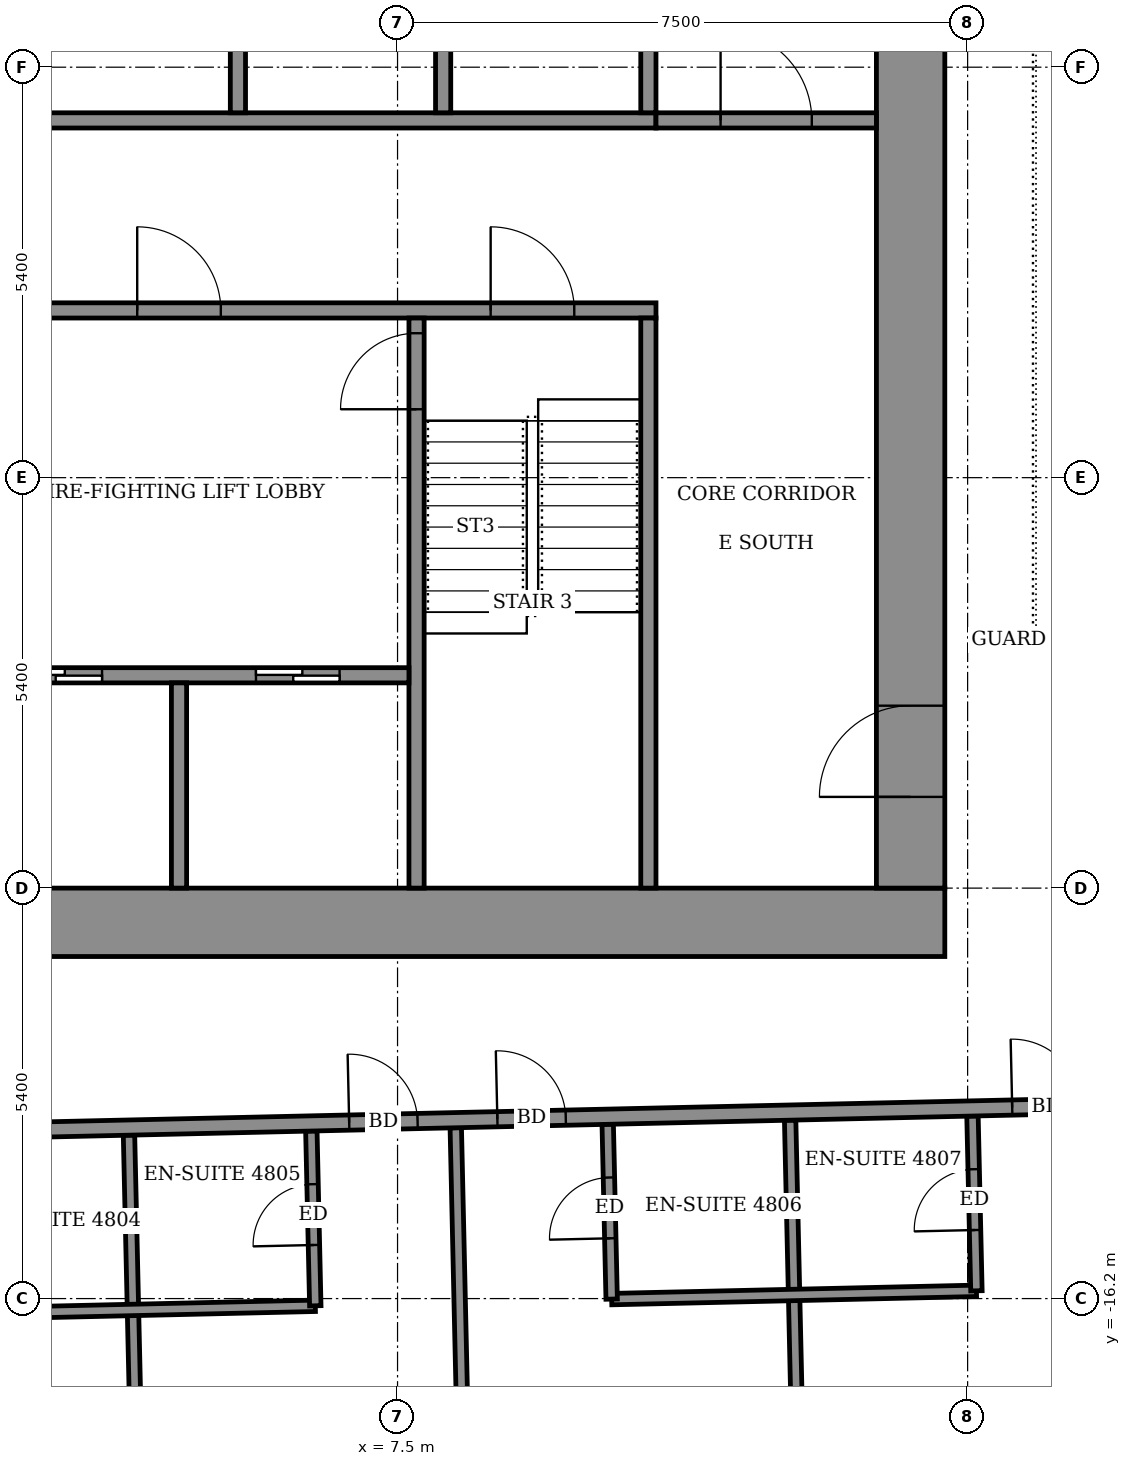
"""IFC4 building model, lengths in metres.
Left out: names, types, materials, properties, quantities, classifications, styles, units other than length and angle.
Written with IfcOpenShell. Run it as: python <this file> out.ifc"""

import sys

from ifc_helpers import new_model, si_unit, direction, frame, frame_2d, origin, place, context, subcontext, project, spatial, rectangle, extrude, element, fill, save


model = new_model("IFC4")
c1 = context("Model", 3, precision=1e-05, world=origin(), true_north=direction((0.0, 1.0)))
c2 = subcontext(c1, "Body", "Model", "MODEL_VIEW")
j1 = project(units=[si_unit("LENGTHUNIT", "METRE"), si_unit("PLANEANGLEUNIT", "RADIAN")], contexts=[c1])
p1 = place(None, origin())
s1 = spatial("IfcSite", under=j1, at=p1, CompositionType="ELEMENT")
p2 = place(p1, origin())
s2 = spatial("IfcBuilding", under=s1, at=p2, CompositionType="ELEMENT")
p3 = place(p2, frame((0.0, 0.0, 189.7)))
s3 = spatial("IfcBuildingStorey", under=s2, at=p3, CompositionType="ELEMENT", Elevation=189.7)
p4 = place(p3, frame((4.102, -19.999, 0.0), z_axis=(0.0, 0.0, 1.0), x_axis=(-0.022688785847, 0.999742576365, 0.0)))
e1 = element("IfcWall", 1, at=p4, inside=s3, PredefinedType="PARTITIONING", context=c2, shape_type="SweptSolid", body=[
    extrude(rectangle(XDim=5.95, YDim=0.15, at=frame_2d((2.975, 0.0))), origin(), (0.0, 0.0, 1.0), 2.55),
])
p5 = place(p3, frame((8.407, -20.201, 0.0), z_axis=(0.0, 0.0, 1.0), x_axis=(-0.022540379945, 0.999745933361, 0.0)))
e2 = element("IfcWall", 2, at=p5, inside=s3, PredefinedType="PARTITIONING", context=c2, shape_type="SweptSolid", body=[
    extrude(rectangle(XDim=6.25, YDim=0.15, at=frame_2d((3.125, 0.0))), origin(), (0.0, 0.0, 1.0), 3.05),
])
p6 = place(p3, frame((12.806, -20.101, 0.0), z_axis=(0.0, 0.0, 1.0), x_axis=(-0.022540379945, 0.999745933361, 0.0)))
e3 = element("IfcWall", 3, at=p6, inside=s3, PredefinedType="PARTITIONING", context=c2, shape_type="SweptSolid", body=[
    extrude(rectangle(XDim=6.25, YDim=0.15, at=frame_2d((3.125, 0.0))), origin(), (0.0, 0.0, 1.0), 2.55),
])
p7 = place(p3, frame((1.62, -16.404, 0.0), z_axis=(0.0, 0.0, 1.0), x_axis=(0.999741415159, 0.022739894798, 0.0)))
e4 = element("IfcWall", 4, at=p7, inside=s3, PredefinedType="PARTITIONING", context=c2, shape_type="SweptSolid", body=[
    extrude(rectangle(XDim=4.799, YDim=0.15, at=frame_2d((2.399, 0.0))), origin(), (0.0, 0.0, 1.0), 3.05),
])
p8 = place(p3, frame((6.418, -16.295, 0.0), z_axis=(0.0, 0.0, 1.0), x_axis=(-0.022615284993, 0.999744241736, 0.0)))
e5 = element("IfcWall", 5, at=p8, inside=s3, PredefinedType="PARTITIONING", context=c2, shape_type="SweptSolid", body=[
    extrude(rectangle(XDim=2.299, YDim=0.15, at=frame_2d((1.15, 0.0))), origin(), (0.0, 0.0, 1.0), 3.05),
])
p9 = place(p8, frame((0.8, 0.0, 0.0)))
e6 = element("IfcOpeningElement", 6, at=p9, cuts=e5, PredefinedType="OPENING", context=c2, shape_type="SweptSolid", body=[
    extrude(rectangle(XDim=0.8, YDim=2.1, at=frame_2d((0.4, 1.05))), frame((0.0, 0.085, 0.0), z_axis=(0.0, -1.0, 0.0), x_axis=(1.0, 0.0, 0.0)), (0.0, 0.0, 1.0), 0.17),
])
p10 = place(p3, frame((10.317, -16.207, 0.0), z_axis=(0.0, 0.0, 1.0), x_axis=(0.99974154664, 0.022734113616, 0.0)))
e7 = element("IfcWall", 7, at=p10, inside=s3, PredefinedType="PARTITIONING", context=c2, shape_type="SweptSolid", body=[
    extrude(rectangle(XDim=4.8, YDim=0.15, at=frame_2d((2.4, 0.0))), origin(), (0.0, 0.0, 1.0), 3.05),
])
p11 = place(p3, frame((10.317, -16.207, 0.0), z_axis=(0.0, 0.0, 1.0), x_axis=(-0.022603288534, 0.999744513037, 0.0)))
e8 = element("IfcWall", 8, at=p11, inside=s3, PredefinedType="PARTITIONING", context=c2, shape_type="SweptSolid", body=[
    extrude(rectangle(XDim=2.301, YDim=0.15, at=frame_2d((1.15, 0.0))), origin(), (0.0, 0.0, 1.0), 3.05),
])
p12 = place(p11, frame((0.8, 0.0, 0.0)))
e9 = element("IfcOpeningElement", 9, at=p12, cuts=e8, PredefinedType="OPENING", context=c2, shape_type="SweptSolid", body=[
    extrude(rectangle(XDim=0.8, YDim=2.1, at=frame_2d((0.4, 1.05))), frame((0.0, 0.085, 0.0), z_axis=(0.0, -1.0, 0.0), x_axis=(1.0, 0.0, 0.0)), (0.0, 0.0, 1.0), 0.17),
])
p13 = place(p3, frame((15.116, -16.098, 0.0), z_axis=(0.0, 0.0, 1.0), x_axis=(-0.022615284993, 0.999744241736, 0.0)))
e10 = element("IfcWall", 10, at=p13, inside=s3, PredefinedType="PARTITIONING", context=c2, shape_type="SweptSolid", body=[
    extrude(rectangle(XDim=2.299, YDim=0.15, at=frame_2d((1.15, 0.0))), origin(), (0.0, 0.0, 1.0), 3.05),
])
p14 = place(p13, frame((0.8, 0.0, 0.0)))
e11 = element("IfcOpeningElement", 11, at=p14, cuts=e10, PredefinedType="OPENING", context=c2, shape_type="SweptSolid", body=[
    extrude(rectangle(XDim=0.8, YDim=2.1, at=frame_2d((0.4, 1.05))), frame((0.0, 0.085, 0.0), z_axis=(0.0, -1.0, 0.0), x_axis=(1.0, 0.0, 0.0)), (0.0, 0.0, 1.0), 0.17),
])
p15 = place(p3, frame((-21.279, -14.523, 0.0), z_axis=(0.0, 0.0, 1.0), x_axis=(0.999742878501, 0.022675468818, 0.0)))
e12 = element("IfcWall", 12, at=p15, inside=s3, PredefinedType="PARTITIONING", context=c2, shape_type="SweptSolid", body=[
    extrude(rectangle(XDim=46.48, YDim=0.2, at=frame_2d((23.24, 0.0))), origin(), (0.0, 0.0, 1.0), 3.05),
])
p16 = place(p15, frame((1.4, 0.0, 0.0)))
e13 = element("IfcOpeningElement", 13, at=p16, cuts=e12, PredefinedType="OPENING", context=c2, shape_type="SweptSolid", body=[
    extrude(rectangle(XDim=1.0, YDim=2.1, at=frame_2d((0.5, 1.05))), frame((0.0, 0.11, 0.0), z_axis=(0.0, -1.0, 0.0), x_axis=(1.0, 0.0, 0.0)), (0.0, 0.0, 1.0), 0.22),
])
p17 = place(p15, frame((5.95, 0.0, 0.0)))
e14 = element("IfcOpeningElement", 14, at=p17, cuts=e12, PredefinedType="OPENING", context=c2, shape_type="SweptSolid", body=[
    extrude(rectangle(XDim=0.9, YDim=2.1, at=frame_2d((0.45, 1.05))), frame((0.0, 0.11, 0.0), z_axis=(0.0, -1.0, 0.0), x_axis=(1.0, 0.0, 0.0)), (0.0, 0.0, 1.0), 0.22),
])
p18 = place(p15, frame((10.575, 0.0, 0.0)))
e15 = element("IfcOpeningElement", 15, at=p18, cuts=e12, PredefinedType="OPENING", context=c2, shape_type="SweptSolid", body=[
    extrude(rectangle(XDim=0.9, YDim=2.1, at=frame_2d((0.45, 1.05))), frame((0.0, 0.11, 0.0), z_axis=(0.0, -1.0, 0.0), x_axis=(1.0, 0.0, 0.0)), (0.0, 0.0, 1.0), 0.22),
])
p19 = place(p15, frame((12.625, 0.0, 0.0)))
e16 = element("IfcOpeningElement", 16, at=p19, cuts=e12, PredefinedType="OPENING", context=c2, shape_type="SweptSolid", body=[
    extrude(rectangle(XDim=0.9, YDim=2.1, at=frame_2d((0.45, 1.05))), frame((0.0, 0.11, 0.0), z_axis=(0.0, -1.0, 0.0), x_axis=(1.0, 0.0, 0.0)), (0.0, 0.0, 1.0), 0.22),
])
p20 = place(p15, frame((19.4, 0.0, 0.0)))
e17 = element("IfcOpeningElement", 17, at=p20, cuts=e12, PredefinedType="OPENING", context=c2, shape_type="SweptSolid", body=[
    extrude(rectangle(XDim=0.9, YDim=2.1, at=frame_2d((0.45, 1.05))), frame((0.0, 0.11, 0.0), z_axis=(0.0, -1.0, 0.0), x_axis=(1.0, 0.0, 0.0)), (0.0, 0.0, 1.0), 0.22),
])
p21 = place(p15, frame((21.375, 0.0, 0.0)))
e18 = element("IfcOpeningElement", 18, at=p21, cuts=e12, PredefinedType="OPENING", context=c2, shape_type="SweptSolid", body=[
    extrude(rectangle(XDim=0.9, YDim=2.1, at=frame_2d((0.45, 1.05))), frame((0.0, 0.11, 0.0), z_axis=(0.0, -1.0, 0.0), x_axis=(1.0, 0.0, 0.0)), (0.0, 0.0, 1.0), 0.22),
])
p22 = place(p15, frame((28.15, 0.0, 0.0)))
e19 = element("IfcOpeningElement", 19, at=p22, cuts=e12, PredefinedType="OPENING", context=c2, shape_type="SweptSolid", body=[
    extrude(rectangle(XDim=0.9, YDim=2.1, at=frame_2d((0.45, 1.05))), frame((0.0, 0.11, 0.0), z_axis=(0.0, -1.0, 0.0), x_axis=(1.0, 0.0, 0.0)), (0.0, 0.0, 1.0), 0.22),
])
p23 = place(p15, frame((30.1, 0.0, 0.0)))
e20 = element("IfcOpeningElement", 20, at=p23, cuts=e12, PredefinedType="OPENING", context=c2, shape_type="SweptSolid", body=[
    extrude(rectangle(XDim=0.9, YDim=2.1, at=frame_2d((0.45, 1.05))), frame((0.0, 0.11, 0.0), z_axis=(0.0, -1.0, 0.0), x_axis=(1.0, 0.0, 0.0)), (0.0, 0.0, 1.0), 0.22),
])
p24 = place(p15, frame((36.875, 0.0, 0.0)))
e21 = element("IfcOpeningElement", 21, at=p24, cuts=e12, PredefinedType="OPENING", context=c2, shape_type="SweptSolid", body=[
    extrude(rectangle(XDim=0.9, YDim=2.1, at=frame_2d((0.45, 1.05))), frame((0.0, 0.11, 0.0), z_axis=(0.0, -1.0, 0.0), x_axis=(1.0, 0.0, 0.0)), (0.0, 0.0, 1.0), 0.22),
])
p25 = place(p15, frame((43.89, 0.0, 0.0)))
e22 = element("IfcOpeningElement", 22, at=p25, cuts=e12, PredefinedType="OPENING", context=c2, shape_type="SweptSolid", body=[
    extrude(rectangle(XDim=1.0, YDim=2.1, at=frame_2d((0.5, 1.05))), frame((0.0, 0.11, 0.0), z_axis=(0.0, -1.0, 0.0), x_axis=(1.0, 0.0, 0.0)), (0.0, 0.0, 1.0), 0.22),
])
p26 = place(p15, frame((39.05, 0.0, 0.0)))
e23 = element("IfcOpeningElement", 23, at=p26, cuts=e12, PredefinedType="OPENING", context=c2, shape_type="SweptSolid", body=[
    extrude(rectangle(XDim=0.9, YDim=2.1, at=frame_2d((0.45, 1.05))), frame((0.0, 0.11, 0.0), z_axis=(0.0, -1.0, 0.0), x_axis=(1.0, 0.0, 0.0)), (0.0, 0.0, 1.0), 0.22),
])
p27 = place(p3, frame((-14.7, -11.25, 0.0), z_axis=(0.0, 0.0, 1.0), x_axis=(1.0, 0.0, 0.0)))
e24 = element("IfcWall", 24, at=p27, inside=s3, PredefinedType="SHEAR", context=c2, shape_type="SweptSolid", body=[
    extrude(rectangle(XDim=29.4, YDim=0.9, at=frame_2d((14.7, 0.0))), origin(), (0.0, 0.0, 1.0), 3.6),
])
p28 = place(p3, frame((14.25, -10.8, 0.0), z_axis=(0.0, 0.0, 1.0), x_axis=(0.0, 1.0, 0.0)))
e25 = element("IfcWall", 25, at=p28, inside=s3, PredefinedType="SHEAR", context=c2, shape_type="SweptSolid", body=[
    extrude(rectangle(XDim=21.6, YDim=0.9, at=frame_2d((10.8, 0.0))), origin(), (0.0, 0.0, 1.0), 3.6),
])
p29 = place(p28, frame((1.2, 0.0, 0.0)))
e26 = element("IfcOpeningElement", 26, at=p29, cuts=e25, PredefinedType="OPENING", context=c2, shape_type="SweptSolid", body=[
    extrude(rectangle(XDim=1.2, YDim=2.1, at=frame_2d((0.6, 1.05))), frame((0.0, 0.46, 0.0), z_axis=(0.0, -1.0, 0.0), x_axis=(1.0, 0.0, 0.0)), (0.0, 0.0, 1.0), 0.92),
])
p30 = place(p3, frame((-10.9, -3.2, 0.0), z_axis=(0.0, 0.0, 1.0), x_axis=(1.0, 0.0, 0.0)))
e27 = element("IfcWall", 27, at=p30, inside=s3, PredefinedType="SHEAR", context=c2, shape_type="SweptSolid", body=[
    extrude(rectangle(XDim=21.8, YDim=0.2, at=frame_2d((10.9, 0.0))), origin(), (0.0, 0.0, 1.0), 3.05),
])
p31 = place(p30, frame((1.075, 0.0, 0.0)))
e28 = element("IfcOpeningElement", 28, at=p31, cuts=e27, PredefinedType="OPENING", context=c2, shape_type="SweptSolid", body=[
    extrude(rectangle(XDim=1.1, YDim=2.1, at=frame_2d((0.55, 1.05))), frame((0.0, 0.11, 0.0), z_axis=(0.0, -1.0, 0.0), x_axis=(1.0, 0.0, 0.0)), (0.0, 0.0, 1.0), 0.22),
])
p32 = place(p30, frame((10.325, 0.0, 0.0)))
e29 = element("IfcOpeningElement", 29, at=p32, cuts=e27, PredefinedType="OPENING", context=c2, shape_type="SweptSolid", body=[
    extrude(rectangle(XDim=1.1, YDim=2.1, at=frame_2d((0.55, 1.05))), frame((0.0, 0.11, 0.0), z_axis=(0.0, -1.0, 0.0), x_axis=(1.0, 0.0, 0.0)), (0.0, 0.0, 1.0), 0.22),
])
p33 = place(p30, frame((19.625, 0.0, 0.0)))
e30 = element("IfcOpeningElement", 30, at=p33, cuts=e27, PredefinedType="OPENING", context=c2, shape_type="SweptSolid", body=[
    extrude(rectangle(XDim=1.1, YDim=2.1, at=frame_2d((0.55, 1.05))), frame((0.0, 0.11, 0.0), z_axis=(0.0, -1.0, 0.0), x_axis=(1.0, 0.0, 0.0)), (0.0, 0.0, 1.0), 0.22),
])
p34 = place(p30, frame((5.7, 0.0, 0.0)))
e31 = element("IfcOpeningElement", 31, at=p34, cuts=e27, PredefinedType="OPENING", context=c2, shape_type="SweptSolid", body=[
    extrude(rectangle(XDim=1.1, YDim=2.1, at=frame_2d((0.55, 1.05))), frame((0.0, 0.11, 0.0), z_axis=(0.0, -1.0, 0.0), x_axis=(1.0, 0.0, 0.0)), (0.0, 0.0, 1.0), 0.22),
])
p35 = place(p30, frame((14.975, 0.0, 0.0)))
e32 = element("IfcOpeningElement", 32, at=p35, cuts=e27, PredefinedType="OPENING", context=c2, shape_type="SweptSolid", body=[
    extrude(rectangle(XDim=1.1, YDim=2.1, at=frame_2d((0.55, 1.05))), frame((0.0, 0.11, 0.0), z_axis=(0.0, -1.0, 0.0), x_axis=(1.0, 0.0, 0.0)), (0.0, 0.0, 1.0), 0.22),
])
p36 = place(p3, frame((-10.9, -0.7, 0.0), z_axis=(0.0, 0.0, 1.0), x_axis=(1.0, 0.0, 0.0)))
e33 = element("IfcWall", 33, at=p36, inside=s3, PredefinedType="SHEAR", context=c2, shape_type="SweptSolid", body=[
    extrude(rectangle(XDim=21.8, YDim=0.2, at=frame_2d((10.9, 0.0))), origin(), (0.0, 0.0, 1.0), 3.05),
])
p37 = place(p3, frame((7.75, -10.8, 0.0), z_axis=(0.0, 0.0, 1.0), x_axis=(0.0, 1.0, 0.0)))
e34 = element("IfcWall", 34, at=p37, inside=s3, PredefinedType="SHEAR", context=c2, shape_type="SweptSolid", body=[
    extrude(rectangle(XDim=7.5, YDim=0.2, at=frame_2d((3.75, 0.0))), origin(), (0.0, 0.0, 1.0), 3.05),
])
p38 = place(p37, frame((6.3, 0.0, 0.0)))
e35 = element("IfcOpeningElement", 35, at=p38, cuts=e34, PredefinedType="OPENING", context=c2, shape_type="SweptSolid", body=[
    extrude(rectangle(XDim=1.0, YDim=2.1, at=frame_2d((0.5, 1.05))), frame((0.0, 0.11, 0.0), z_axis=(0.0, -1.0, 0.0), x_axis=(1.0, 0.0, 0.0)), (0.0, 0.0, 1.0), 0.22),
])
p39 = place(p3, frame((10.8, -10.8, 0.0), z_axis=(0.0, 0.0, 1.0), x_axis=(0.0, 1.0, 0.0)))
e36 = element("IfcWall", 36, at=p39, inside=s3, PredefinedType="SHEAR", context=c2, shape_type="SweptSolid", body=[
    extrude(rectangle(XDim=7.5, YDim=0.2, at=frame_2d((3.75, 0.0))), origin(), (0.0, 0.0, 1.0), 3.05),
])
p40 = place(p3, frame((1.6, -8.0, 0.0), z_axis=(0.0, 0.0, 1.0), x_axis=(1.0, 0.0, 0.0)))
e37 = element("IfcWall", 37, at=p40, inside=s3, PredefinedType="SHEAR", context=c2, shape_type="SweptSolid", body=[
    extrude(rectangle(XDim=6.05, YDim=0.2, at=frame_2d((3.025, 0.0))), origin(), (0.0, 0.0, 1.0), 3.05),
])
p41 = place(p40, frame((0.913, 0.0, 0.0)))
e38 = element("IfcOpeningElement", 38, at=p41, cuts=e37, PredefinedType="OPENING", context=c2, shape_type="SweptSolid", body=[
    extrude(rectangle(XDim=1.1, YDim=2.1, at=frame_2d((0.55, 1.05))), frame((0.0, 0.11, 0.0), z_axis=(0.0, -1.0, 0.0), x_axis=(1.0, 0.0, 0.0)), (0.0, 0.0, 1.0), 0.22),
])
p42 = place(p40, frame((4.038, 0.0, 0.0)))
e39 = element("IfcOpeningElement", 39, at=p42, cuts=e37, PredefinedType="OPENING", context=c2, shape_type="SweptSolid", body=[
    extrude(rectangle(XDim=1.1, YDim=2.1, at=frame_2d((0.55, 1.05))), frame((0.0, 0.11, 0.0), z_axis=(0.0, -1.0, 0.0), x_axis=(1.0, 0.0, 0.0)), (0.0, 0.0, 1.0), 0.22),
])
p43 = place(p3, frame((4.625, -10.8, 0.0), z_axis=(0.0, 0.0, 1.0), x_axis=(0.0, 1.0, 0.0)))
e40 = element("IfcWall", 40, at=p43, inside=s3, PredefinedType="SHEAR", context=c2, shape_type="SweptSolid", body=[
    extrude(rectangle(XDim=2.7, YDim=0.2, at=frame_2d((1.35, 0.0))), origin(), (0.0, 0.0, 1.0), 3.05),
])
for number, where, z_axis, x_axis in (
    (41, (5.4, -0.6, 0.0), (0.0, 0.0, 1.0), (0.0, 1.0, 0.0)),
    (42, (8.1, -0.6, 0.0), (0.0, 0.0, 1.0), (0.0, 1.0, 0.0)),
    (43, (10.8, -0.6, 0.0), (0.0, 0.0, 1.0), (0.0, 1.0, 0.0)),
):
    element("IfcWall", number, at=place(p3, frame(where, z_axis=z_axis, x_axis=x_axis)), inside=s3, PredefinedType="SHEAR", context=c2, shape_type="SweptSolid", body=[
        extrude(rectangle(XDim=2.5, YDim=0.2, at=frame_2d((1.25, 0.0))), origin(), (0.0, 0.0, 1.0), 3.05),
    ])
p44 = place(p3, frame((10.9, -0.7, 0.0), z_axis=(0.0, 0.0, 1.0), x_axis=(1.0, 0.0, 0.0)))
e44 = element("IfcWall", 44, at=p44, inside=s3, PredefinedType="STANDARD", context=c2, shape_type="SweptSolid", body=[
    extrude(rectangle(XDim=2.9, YDim=0.2, at=frame_2d((1.45, 0.0))), origin(), (0.0, 0.0, 1.0), 3.05),
])
p45 = place(p44, frame((0.85, 0.0, 0.0)))
e45 = element("IfcOpeningElement", 45, at=p45, cuts=e44, PredefinedType="OPENING", context=c2, shape_type="SweptSolid", body=[
    extrude(rectangle(XDim=1.2, YDim=2.1, at=frame_2d((0.6, 1.05))), frame((0.0, 0.11, 0.0), z_axis=(0.0, -1.0, 0.0), x_axis=(1.0, 0.0, 0.0)), (0.0, 0.0, 1.0), 0.22),
])
p46 = place(p22, origin())
e46 = element("IfcDoor", 46, at=p46, inside=s3, OperationType="SINGLE_SWING_LEFT", PredefinedType="DOOR", context=c2, shape_type="SweptSolid", body=[
    extrude(rectangle(XDim=0.9, YDim=2.1, at=frame_2d((0.45, 1.05))), frame((0.0, 0.025, 0.0), z_axis=(0.0, -1.0, 0.0), x_axis=(1.0, 0.0, 0.0)), (0.0, 0.0, 1.0), 0.05),
])
fill(e19, e46)
p47 = place(p9, origin())
e47 = element("IfcDoor", 47, at=p47, inside=s3, OperationType="SINGLE_SWING_LEFT", PredefinedType="DOOR", context=c2, shape_type="SweptSolid", body=[
    extrude(rectangle(XDim=0.8, YDim=2.1, at=frame_2d((0.4, 1.05))), frame((0.0, 0.025, 0.0), z_axis=(0.0, -1.0, 0.0), x_axis=(1.0, 0.0, 0.0)), (0.0, 0.0, 1.0), 0.05),
])
fill(e6, e47)
p48 = place(p23, origin())
e48 = element("IfcDoor", 48, at=p48, inside=s3, OperationType="SINGLE_SWING_RIGHT", PredefinedType="DOOR", context=c2, shape_type="SweptSolid", body=[
    extrude(rectangle(XDim=0.9, YDim=2.1, at=frame_2d((0.45, 1.05))), frame((0.0, 0.025, 0.0), z_axis=(0.0, -1.0, 0.0), x_axis=(1.0, 0.0, 0.0)), (0.0, 0.0, 1.0), 0.05),
])
fill(e20, e48)
p49 = place(p12, origin())
e49 = element("IfcDoor", 49, at=p49, inside=s3, OperationType="SINGLE_SWING_RIGHT", PredefinedType="DOOR", context=c2, shape_type="SweptSolid", body=[
    extrude(rectangle(XDim=0.8, YDim=2.1, at=frame_2d((0.4, 1.05))), frame((0.0, 0.025, 0.0), z_axis=(0.0, -1.0, 0.0), x_axis=(1.0, 0.0, 0.0)), (0.0, 0.0, 1.0), 0.05),
])
fill(e9, e49)
p50 = place(p24, origin())
e50 = element("IfcDoor", 50, at=p50, inside=s3, OperationType="SINGLE_SWING_LEFT", PredefinedType="DOOR", context=c2, shape_type="SweptSolid", body=[
    extrude(rectangle(XDim=0.9, YDim=2.1, at=frame_2d((0.45, 1.05))), frame((0.0, 0.025, 0.0), z_axis=(0.0, -1.0, 0.0), x_axis=(1.0, 0.0, 0.0)), (0.0, 0.0, 1.0), 0.05),
])
fill(e21, e50)
p51 = place(p14, origin())
e51 = element("IfcDoor", 51, at=p51, inside=s3, OperationType="SINGLE_SWING_LEFT", PredefinedType="DOOR", context=c2, shape_type="SweptSolid", body=[
    extrude(rectangle(XDim=0.8, YDim=2.1, at=frame_2d((0.4, 1.05))), frame((0.0, 0.025, 0.0), z_axis=(0.0, -1.0, 0.0), x_axis=(1.0, 0.0, 0.0)), (0.0, 0.0, 1.0), 0.05),
])
fill(e11, e51)
p52 = place(p29, origin())
e52 = element("IfcDoor", 52, at=p52, inside=s3, OperationType="DOUBLE_DOOR_SINGLE_SWING", PredefinedType="DOOR", context=c2, shape_type="SweptSolid", body=[
    extrude(rectangle(XDim=1.2, YDim=2.1, at=frame_2d((0.6, 1.05))), frame((0.0, 0.025, 0.0), z_axis=(0.0, -1.0, 0.0), x_axis=(1.0, 0.0, 0.0)), (0.0, 0.0, 1.0), 0.05),
])
fill(e26, e52)
p53 = place(p41, origin())
e53 = element("IfcDoor", 53, at=p53, inside=s3, OperationType="SLIDING_TO_LEFT", PredefinedType="DOOR", context=c2, shape_type="SweptSolid", body=[
    extrude(rectangle(XDim=1.1, YDim=2.1, at=frame_2d((0.55, 1.05))), frame((0.0, 0.025, 0.0), z_axis=(0.0, -1.0, 0.0), x_axis=(1.0, 0.0, 0.0)), (0.0, 0.0, 1.0), 0.05),
])
fill(e38, e53)
p54 = place(p42, origin())
e54 = element("IfcDoor", 54, at=p54, inside=s3, OperationType="SLIDING_TO_LEFT", PredefinedType="DOOR", context=c2, shape_type="SweptSolid", body=[
    extrude(rectangle(XDim=1.1, YDim=2.1, at=frame_2d((0.55, 1.05))), frame((0.0, 0.025, 0.0), z_axis=(0.0, -1.0, 0.0), x_axis=(1.0, 0.0, 0.0)), (0.0, 0.0, 1.0), 0.05),
])
fill(e39, e54)
p55 = place(p33, origin())
e55 = element("IfcDoor", 55, at=p55, inside=s3, OperationType="SINGLE_SWING_RIGHT", PredefinedType="DOOR", context=c2, shape_type="SweptSolid", body=[
    extrude(rectangle(XDim=1.1, YDim=2.1, at=frame_2d((0.55, 1.05))), frame((0.0, 0.025, 0.0), z_axis=(0.0, -1.0, 0.0), x_axis=(1.0, 0.0, 0.0)), (0.0, 0.0, 1.0), 0.05),
])
fill(e30, e55)
p56 = place(p35, origin())
e56 = element("IfcDoor", 56, at=p56, inside=s3, OperationType="SINGLE_SWING_LEFT", PredefinedType="DOOR", context=c2, shape_type="SweptSolid", body=[
    extrude(rectangle(XDim=1.1, YDim=2.1, at=frame_2d((0.55, 1.05))), frame((0.0, 0.025, 0.0), z_axis=(0.0, -1.0, 0.0), x_axis=(1.0, 0.0, 0.0)), (0.0, 0.0, 1.0), 0.05),
])
fill(e32, e56)
p57 = place(p38, origin())
e57 = element("IfcDoor", 57, at=p57, inside=s3, OperationType="SINGLE_SWING_RIGHT", PredefinedType="DOOR", context=c2, shape_type="SweptSolid", body=[
    extrude(rectangle(XDim=1.0, YDim=2.1, at=frame_2d((0.5, 1.05))), frame((0.0, 0.025, 0.0), z_axis=(0.0, -1.0, 0.0), x_axis=(1.0, 0.0, 0.0)), (0.0, 0.0, 1.0), 0.05),
])
fill(e35, e57)
p58 = place(p45, origin())
e58 = element("IfcDoor", 58, at=p58, inside=s3, OperationType="SINGLE_SWING_LEFT", PredefinedType="DOOR", context=c2, shape_type="SweptSolid", body=[
    extrude(rectangle(XDim=1.2, YDim=2.1, at=frame_2d((0.6, 1.05))), frame((0.0, 0.025, 0.0), z_axis=(0.0, -1.0, 0.0), x_axis=(1.0, 0.0, 0.0)), (0.0, 0.0, 1.0), 0.05),
])
fill(e45, e58)
save(model, sys.argv[1])
